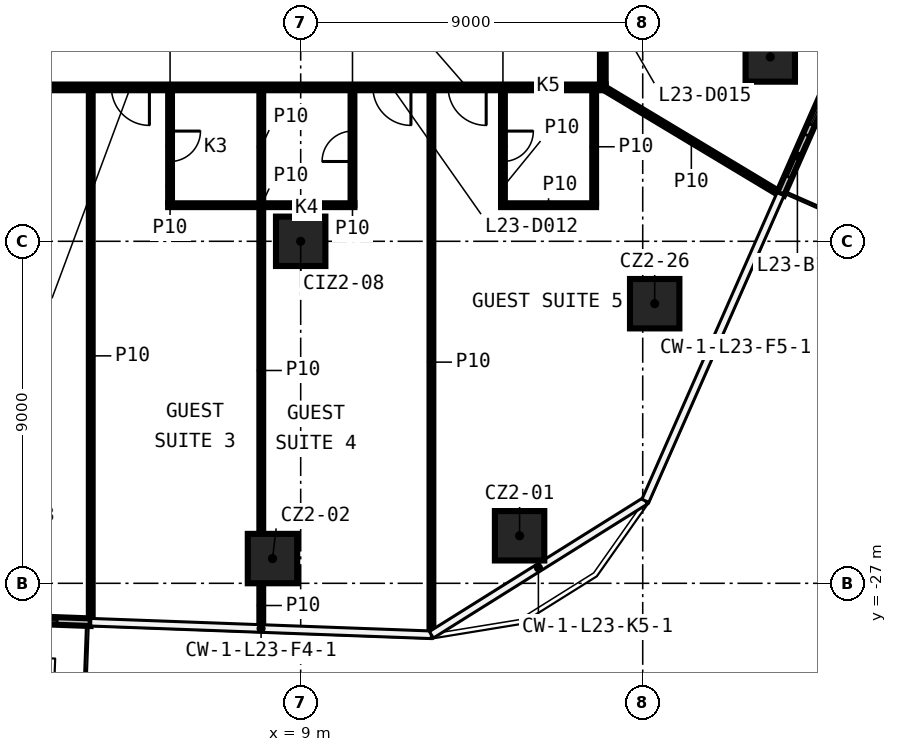
"""IFC4 building model, lengths in metres.
Left out: names, types, materials, properties, quantities, classifications, styles, units other than length and angle.
Written with IfcOpenShell. Run it as: python <this file> out.ifc"""

import sys

from ifc_helpers import new_model, si_unit, direction, frame, frame_2d, origin, origin_2d, place, context, subcontext, project, spatial, rectangle, extrude, element, fill, save


model = new_model("IFC4")
c1 = context("Model", 3, precision=1e-05, world=origin(), true_north=direction((0.0, 1.0)))
c2 = subcontext(c1, "Body", "Model", "MODEL_VIEW")
j1 = project(units=[si_unit("LENGTHUNIT", "METRE"), si_unit("PLANEANGLEUNIT", "RADIAN")], contexts=[c1])
p1 = place(None, origin())
s1 = spatial("IfcSite", under=j1, at=p1, CompositionType="ELEMENT")
p2 = place(p1, origin())
s2 = spatial("IfcBuilding", under=s1, at=p2, CompositionType="ELEMENT")
p3 = place(p2, frame((0.0, 0.0, 110.0)))
s3 = spatial("IfcBuildingStorey", under=s2, at=p3, CompositionType="ELEMENT", Elevation=110.0)
for number, where, z_axis, x_axis in (
    (1, (14.76, -25.749, 0.0), (0.0, 0.0, 1.0), (1.0, 0.0, 0.0)),
    (2, (8.258, -26.349, 0.0), (0.0, 0.0, 1.0), (1.0, 0.0, 0.0)),
    (3, (21.356, -13.15, 0.0), (0.0, 0.0, 1.0), (1.0, 0.0, 0.0)),
    (4, (18.315, -19.642, 0.0), (0.0, 0.0, 1.0), (1.0, 0.0, 0.0)),
    (5, (9.0, -18.0, 0.0), (0.0, 0.0, 1.0), (1.0, 0.0, 0.0)),
):
    element("IfcColumn", number, at=place(p3, frame(where, z_axis=z_axis, x_axis=x_axis)), inside=s3, PredefinedType="COLUMN", context=c2, shape_type="SweptSolid", body=[
        extrude(rectangle(XDim=1.3, YDim=1.3, at=origin_2d()), origin(), (0.0, 0.0, 1.0), 3.3),
    ])
p4 = place(p3, frame((5.513, -17.05, 0.0), z_axis=(0.0, 0.0, 1.0), x_axis=(1.0, 0.0, 0.0)))
e6 = element("IfcWall", 6, at=p4, inside=s3, PredefinedType="PARTITIONING", context=c2, shape_type="SweptSolid", body=[
    extrude(rectangle(XDim=4.9, YDim=0.1, at=frame_2d((2.45, 0.0))), origin(), (0.0, 0.0, 1.0), 3.3),
])
p5 = place(p3, frame((14.272, -17.05, 0.0), z_axis=(0.0, 0.0, 1.0), x_axis=(1.0, 0.0, 0.0)))
e7 = element("IfcWall", 7, at=p5, inside=s3, PredefinedType="PARTITIONING", context=c2, shape_type="SweptSolid", body=[
    extrude(rectangle(XDim=2.5, YDim=0.1, at=frame_2d((1.25, 0.0))), origin(), (0.0, 0.0, 1.0), 3.3),
])
p6 = place(p3, frame((17.025, -13.95, 0.0), z_axis=(0.0, 0.0, 1.0), x_axis=(-1.0, 0.0, 0.0)))
e8 = element("IfcWall", 8, at=p6, inside=s3, PredefinedType="PARTITIONING", context=c2, shape_type="SweptSolid", body=[
    extrude(rectangle(XDim=34.05, YDim=0.15, at=frame_2d((17.025, 0.0))), origin(), (0.0, 0.0, 1.0), 3.3),
])
p7 = place(p6, frame((31.974, 0.0, 0.0)))
e9 = element("IfcOpeningElement", 9, at=p7, cuts=e8, PredefinedType="OPENING", context=c2, shape_type="SweptSolid", body=[
    extrude(rectangle(XDim=0.9, YDim=2.1, at=frame_2d((0.45, 1.05))), frame((0.0, 0.085, 0.0), z_axis=(0.0, -1.0, 0.0), x_axis=(1.0, 0.0, 0.0)), (0.0, 0.0, 1.0), 0.17),
])
p8 = place(p6, frame((27.543, 0.0, 0.0)))
e10 = element("IfcOpeningElement", 10, at=p8, cuts=e8, PredefinedType="OPENING", context=c2, shape_type="SweptSolid", body=[
    extrude(rectangle(XDim=1.0, YDim=2.1, at=frame_2d((0.5, 1.05))), frame((0.0, 0.085, 0.0), z_axis=(0.0, -1.0, 0.0), x_axis=(1.0, 0.0, 0.0)), (0.0, 0.0, 1.0), 0.17),
])
p9 = place(p6, frame((16.333, 0.0, 0.0)))
e11 = element("IfcOpeningElement", 11, at=p9, cuts=e8, PredefinedType="OPENING", context=c2, shape_type="SweptSolid", body=[
    extrude(rectangle(XDim=1.0, YDim=2.1, at=frame_2d((0.5, 1.05))), frame((0.0, 0.085, 0.0), z_axis=(0.0, -1.0, 0.0), x_axis=(1.0, 0.0, 0.0)), (0.0, 0.0, 1.0), 0.17),
])
p10 = place(p6, frame((12.006, 0.0, 0.0)))
e12 = element("IfcOpeningElement", 12, at=p10, cuts=e8, PredefinedType="OPENING", context=c2, shape_type="SweptSolid", body=[
    extrude(rectangle(XDim=1.0, YDim=2.1, at=frame_2d((0.5, 1.05))), frame((0.0, 0.085, 0.0), z_axis=(0.0, -1.0, 0.0), x_axis=(1.0, 0.0, 0.0)), (0.0, 0.0, 1.0), 0.17),
])
p11 = place(p6, frame((5.124, 0.0, 0.0)))
e13 = element("IfcOpeningElement", 13, at=p11, cuts=e8, PredefinedType="OPENING", context=c2, shape_type="SweptSolid", body=[
    extrude(rectangle(XDim=1.0, YDim=2.1, at=frame_2d((0.5, 1.05))), frame((0.0, 0.085, 0.0), z_axis=(0.0, -1.0, 0.0), x_axis=(1.0, 0.0, 0.0)), (0.0, 0.0, 1.0), 0.17),
])
p12 = place(p6, frame((3.144, 0.0, 0.0)))
e14 = element("IfcOpeningElement", 14, at=p12, cuts=e8, PredefinedType="OPENING", context=c2, shape_type="SweptSolid", body=[
    extrude(rectangle(XDim=1.0, YDim=2.1, at=frame_2d((0.5, 1.05))), frame((0.0, 0.085, 0.0), z_axis=(0.0, -1.0, 0.0), x_axis=(1.0, 0.0, 0.0)), (0.0, 0.0, 1.0), 0.17),
])
p13 = place(p3, frame((16.95, 13.875, 0.0), z_axis=(0.0, 0.0, 1.0), x_axis=(0.0, -1.0, 0.0)))
e15 = element("IfcWall", 15, at=p13, inside=s3, PredefinedType="PARTITIONING", context=c2, shape_type="SweptSolid", body=[
    extrude(rectangle(XDim=27.75, YDim=0.15, at=frame_2d((13.875, 0.0))), origin(), (0.0, 0.0, 1.0), 3.3),
])
p14 = place(p13, frame((24.917, 0.0, 0.0)))
e16 = element("IfcOpeningElement", 16, at=p14, cuts=e15, PredefinedType="OPENING", context=c2, shape_type="SweptSolid", body=[
    extrude(rectangle(XDim=0.9, YDim=2.1, at=frame_2d((0.45, 1.05))), frame((0.0, 0.085, 0.0), z_axis=(0.0, -1.0, 0.0), x_axis=(1.0, 0.0, 0.0)), (0.0, 0.0, 1.0), 0.17),
])
p15 = place(p13, frame((20.086, 0.0, 0.0)))
e17 = element("IfcOpeningElement", 17, at=p15, cuts=e15, PredefinedType="OPENING", context=c2, shape_type="SweptSolid", body=[
    extrude(rectangle(XDim=0.9, YDim=2.1, at=frame_2d((0.45, 1.05))), frame((0.0, 0.085, 0.0), z_axis=(0.0, -1.0, 0.0), x_axis=(1.0, 0.0, 0.0)), (0.0, 0.0, 1.0), 0.17),
])
p16 = place(p13, frame((16.047, 0.0, 0.0)))
e18 = element("IfcOpeningElement", 18, at=p16, cuts=e15, PredefinedType="OPENING", context=c2, shape_type="SweptSolid", body=[
    extrude(rectangle(XDim=0.9, YDim=2.1, at=frame_2d((0.45, 1.05))), frame((0.0, 0.085, 0.0), z_axis=(0.0, -1.0, 0.0), x_axis=(1.0, 0.0, 0.0)), (0.0, 0.0, 1.0), 0.17),
])
p17 = place(p13, frame((11.091, 0.0, 0.0)))
e19 = element("IfcOpeningElement", 19, at=p17, cuts=e15, PredefinedType="OPENING", context=c2, shape_type="SweptSolid", body=[
    extrude(rectangle(XDim=0.9, YDim=2.1, at=frame_2d((0.45, 1.05))), frame((0.0, 0.085, 0.0), z_axis=(0.0, -1.0, 0.0), x_axis=(1.0, 0.0, 0.0)), (0.0, 0.0, 1.0), 0.17),
])
p18 = place(p13, frame((7.093, 0.0, 0.0)))
e20 = element("IfcOpeningElement", 20, at=p18, cuts=e15, PredefinedType="OPENING", context=c2, shape_type="SweptSolid", body=[
    extrude(rectangle(XDim=0.9, YDim=2.1, at=frame_2d((0.45, 1.05))), frame((0.0, 0.085, 0.0), z_axis=(0.0, -1.0, 0.0), x_axis=(1.0, 0.0, 0.0)), (0.0, 0.0, 1.0), 0.17),
])
p19 = place(p13, frame((2.057, 0.0, 0.0)))
e21 = element("IfcOpeningElement", 21, at=p19, cuts=e15, PredefinedType="OPENING", context=c2, shape_type="SweptSolid", body=[
    extrude(rectangle(XDim=0.9, YDim=2.1, at=frame_2d((0.45, 1.05))), frame((0.0, 0.085, 0.0), z_axis=(0.0, -1.0, 0.0), x_axis=(1.0, 0.0, 0.0)), (0.0, 0.0, 1.0), 0.17),
])
p20 = place(p3, frame((16.722, -17.0, 0.0), z_axis=(0.0, 0.0, 1.0), x_axis=(0.0, 1.0, 0.0)))
e22 = element("IfcWall", 22, at=p20, inside=s3, PredefinedType="PARTITIONING", context=c2, shape_type="SweptSolid", body=[
    extrude(rectangle(XDim=2.975, YDim=0.1, at=frame_2d((1.488, 0.0))), origin(), (0.0, 0.0, 1.0), 3.3),
])
p21 = place(p3, frame((14.322, -14.025, 0.0), z_axis=(0.0, 0.0, 1.0), x_axis=(0.0, -1.0, 0.0)))
e23 = element("IfcWall", 23, at=p21, inside=s3, PredefinedType="PARTITIONING", context=c2, shape_type="SweptSolid", body=[
    extrude(rectangle(XDim=3.025, YDim=0.1, at=frame_2d((1.513, 0.0))), origin(), (0.0, 0.0, 1.0), 3.3),
])
p22 = place(p21, frame((1.075, 0.0, 0.0)))
e24 = element("IfcOpeningElement", 24, at=p22, cuts=e23, PredefinedType="OPENING", context=c2, shape_type="SweptSolid", body=[
    extrude(rectangle(XDim=0.8, YDim=2.1, at=frame_2d((0.4, 1.05))), frame((0.0, 0.06, 0.0), z_axis=(0.0, -1.0, 0.0), x_axis=(1.0, 0.0, 0.0)), (0.0, 0.0, 1.0), 0.12),
])
p23 = place(p3, frame((12.44, -28.334, 0.0), z_axis=(0.0, 0.0, 1.0), x_axis=(0.0, 1.0, 0.0)))
e25 = element("IfcWall", 25, at=p23, inside=s3, PredefinedType="PARTITIONING", context=c2, shape_type="SweptSolid", body=[
    extrude(rectangle(XDim=14.31, YDim=0.1, at=frame_2d((7.155, 0.0))), origin(), (0.0, 0.0, 1.0), 3.3),
])
p24 = place(p3, frame((10.363, -17.05, 0.0), z_axis=(0.0, 0.0, 1.0), x_axis=(0.0, 1.0, 0.0)))
e26 = element("IfcWall", 26, at=p24, inside=s3, PredefinedType="PARTITIONING", context=c2, shape_type="SweptSolid", body=[
    extrude(rectangle(XDim=3.025, YDim=0.1, at=frame_2d((1.513, 0.0))), origin(), (0.0, 0.0, 1.0), 3.3),
])
p25 = place(p24, frame((1.15, 0.0, 0.0)))
e27 = element("IfcOpeningElement", 27, at=p25, cuts=e26, PredefinedType="OPENING", context=c2, shape_type="SweptSolid", body=[
    extrude(rectangle(XDim=0.8, YDim=2.1, at=frame_2d((0.4, 1.05))), frame((0.0, 0.06, 0.0), z_axis=(0.0, -1.0, 0.0), x_axis=(1.0, 0.0, 0.0)), (0.0, 0.0, 1.0), 0.12),
])
p26 = place(p3, frame((7.963, -28.17, 0.0), z_axis=(0.0, 0.0, 1.0), x_axis=(0.0, 1.0, 0.0)))
e28 = element("IfcWall", 28, at=p26, inside=s3, PredefinedType="PARTITIONING", context=c2, shape_type="SweptSolid", body=[
    extrude(rectangle(XDim=1.171, YDim=0.1, at=frame_2d((0.585, 0.0))), origin(), (0.0, 0.0, 1.0), 3.3),
])
p27 = place(p3, frame((7.963, -25.699, 0.0), z_axis=(0.0, 0.0, 1.0), x_axis=(0.0, 1.0, 0.0)))
e29 = element("IfcWall", 29, at=p27, inside=s3, PredefinedType="PARTITIONING", context=c2, shape_type="SweptSolid", body=[
    extrude(rectangle(XDim=8.599, YDim=0.1, at=frame_2d((4.299, 0.0))), origin(), (0.0, 0.0, 1.0), 3.3),
])
p28 = place(p3, frame((7.963, -17.0, 0.0), z_axis=(0.0, 0.0, 1.0), x_axis=(0.0, 1.0, 0.0)))
e30 = element("IfcWall", 30, at=p28, inside=s3, PredefinedType="PARTITIONING", context=c2, shape_type="SweptSolid", body=[
    extrude(rectangle(XDim=2.975, YDim=0.1, at=frame_2d((1.488, 0.0))), origin(), (0.0, 0.0, 1.0), 3.3),
])
p29 = place(p3, frame((5.563, -14.025, 0.0), z_axis=(0.0, 0.0, 1.0), x_axis=(0.0, -1.0, 0.0)))
e31 = element("IfcWall", 31, at=p29, inside=s3, PredefinedType="PARTITIONING", context=c2, shape_type="SweptSolid", body=[
    extrude(rectangle(XDim=2.975, YDim=0.1, at=frame_2d((1.488, 0.0))), origin(), (0.0, 0.0, 1.0), 3.3),
])
p30 = place(p29, frame((1.075, 0.0, 0.0)))
e32 = element("IfcOpeningElement", 32, at=p30, cuts=e31, PredefinedType="OPENING", context=c2, shape_type="SweptSolid", body=[
    extrude(rectangle(XDim=0.8, YDim=2.1, at=frame_2d((0.4, 1.05))), frame((0.0, 0.06, 0.0), z_axis=(0.0, -1.0, 0.0), x_axis=(1.0, 0.0, 0.0)), (0.0, 0.0, 1.0), 0.12),
])
p31 = place(p3, frame((3.476, -28.004, 0.0), z_axis=(0.0, 0.0, 1.0), x_axis=(0.0, 1.0, 0.0)))
e33 = element("IfcWall", 33, at=p31, inside=s3, PredefinedType="PARTITIONING", context=c2, shape_type="SweptSolid", body=[
    extrude(rectangle(XDim=13.979, YDim=0.1, at=frame_2d((6.99, 0.0))), origin(), (0.0, 0.0, 1.0), 3.3),
])
p32 = place(p3, frame((16.95, -13.95, 0.0), z_axis=(0.0, 0.0, 1.0), x_axis=(0.857183640751, -0.515010879525, 0.0)))
e34 = element("IfcWall", 34, at=p32, inside=s3, PredefinedType="PARTITIONING", context=c2, shape_type="SweptSolid", body=[
    extrude(rectangle(XDim=5.436, YDim=0.1, at=frame_2d((2.718, 0.0))), origin(), (0.0, 0.0, 1.0), 3.3),
])
p33 = place(p3, frame((-9.975, -27.528, 0.0), z_axis=(0.0, 0.0, 1.0), x_axis=(0.999319917794, -0.036874135924, 0.0)))
e35 = element("IfcWall", 35, at=p33, inside=s3, PredefinedType="SOLIDWALL", context=c2, shape_type="SweptSolid", body=[
    extrude(rectangle(XDim=13.46, YDim=0.2, at=frame_2d((6.73, 0.0))), origin(), (0.0, 0.0, 1.0), 3.3),
])
p34 = place(p33, frame((2.0, 0.0, 0.6)))
e36 = element("IfcOpeningElement", 36, at=p34, cuts=e35, PredefinedType="OPENING", context=c2, shape_type="SweptSolid", body=[
    extrude(rectangle(XDim=1.6, YDim=2.4, at=frame_2d((0.8, 1.2))), frame((0.0, 0.11, 0.0), z_axis=(0.0, -1.0, 0.0), x_axis=(1.0, 0.0, 0.0)), (0.0, 0.0, 1.0), 0.22),
])
p35 = place(p33, frame((0.5, 0.0, 0.0)))
e37 = element("IfcOpeningElement", 37, at=p35, cuts=e35, PredefinedType="OPENING", context=c2, shape_type="SweptSolid", body=[
    extrude(rectangle(XDim=1.2, YDim=2.4, at=frame_2d((0.6, 1.2))), frame((0.0, 0.11, 0.0), z_axis=(0.0, -1.0, 0.0), x_axis=(1.0, 0.0, 0.0)), (0.0, 0.0, 1.0), 0.22),
])
p36 = place(p33, frame((4.987, 0.0, 0.6)))
e38 = element("IfcOpeningElement", 38, at=p36, cuts=e35, PredefinedType="OPENING", context=c2, shape_type="SweptSolid", body=[
    extrude(rectangle(XDim=1.6, YDim=2.4, at=frame_2d((0.8, 1.2))), frame((0.0, 0.11, 0.0), z_axis=(0.0, -1.0, 0.0), x_axis=(1.0, 0.0, 0.0)), (0.0, 0.0, 1.0), 0.22),
])
p37 = place(p33, frame((6.887, 0.0, 0.0)))
e39 = element("IfcOpeningElement", 39, at=p37, cuts=e35, PredefinedType="OPENING", context=c2, shape_type="SweptSolid", body=[
    extrude(rectangle(XDim=1.2, YDim=2.4, at=frame_2d((0.6, 1.2))), frame((0.0, 0.11, 0.0), z_axis=(0.0, -1.0, 0.0), x_axis=(1.0, 0.0, 0.0)), (0.0, 0.0, 1.0), 0.22),
])
p38 = place(p33, frame((10.974, 0.0, 0.6)))
e40 = element("IfcOpeningElement", 40, at=p38, cuts=e35, PredefinedType="OPENING", context=c2, shape_type="SweptSolid", body=[
    extrude(rectangle(XDim=1.6, YDim=2.4, at=frame_2d((0.8, 1.2))), frame((0.0, 0.11, 0.0), z_axis=(0.0, -1.0, 0.0), x_axis=(1.0, 0.0, 0.0)), (0.0, 0.0, 1.0), 0.22),
])
p39 = place(p33, frame((9.474, 0.0, 0.0)))
e41 = element("IfcOpeningElement", 41, at=p39, cuts=e35, PredefinedType="OPENING", context=c2, shape_type="SweptSolid", body=[
    extrude(rectangle(XDim=1.2, YDim=2.4, at=frame_2d((0.6, 1.2))), frame((0.0, 0.11, 0.0), z_axis=(0.0, -1.0, 0.0), x_axis=(1.0, 0.0, 0.0)), (0.0, 0.0, 1.0), 0.22),
])
p40 = place(p3, frame((21.626, -16.76, 0.0), z_axis=(0.0, 0.0, 1.0), x_axis=(0.403293642116, 0.915070619258, 0.0)))
e42 = element("IfcWall", 42, at=p40, inside=s3, PredefinedType="SOLIDWALL", context=c2, shape_type="SweptSolid", body=[
    extrude(rectangle(XDim=17.657, YDim=0.2, at=frame_2d((8.829, 0.0))), origin(), (0.0, 0.0, 1.0), 3.3),
])
p41 = place(p40, frame((2.0, 0.0, 0.6)))
e43 = element("IfcOpeningElement", 43, at=p41, cuts=e42, PredefinedType="OPENING", context=c2, shape_type="SweptSolid", body=[
    extrude(rectangle(XDim=1.6, YDim=2.4, at=frame_2d((0.8, 1.2))), frame((0.0, 0.11, 0.0), z_axis=(0.0, -1.0, 0.0), x_axis=(1.0, 0.0, 0.0)), (0.0, 0.0, 1.0), 0.22),
])
p42 = place(p40, frame((0.5, 0.0, 0.0)))
e44 = element("IfcOpeningElement", 44, at=p42, cuts=e42, PredefinedType="OPENING", context=c2, shape_type="SweptSolid", body=[
    extrude(rectangle(XDim=1.2, YDim=2.4, at=frame_2d((0.6, 1.2))), frame((0.0, 0.11, 0.0), z_axis=(0.0, -1.0, 0.0), x_axis=(1.0, 0.0, 0.0)), (0.0, 0.0, 1.0), 0.22),
])
p43 = place(p40, frame((6.414, 0.0, 0.6)))
e45 = element("IfcOpeningElement", 45, at=p43, cuts=e42, PredefinedType="OPENING", context=c2, shape_type="SweptSolid", body=[
    extrude(rectangle(XDim=1.6, YDim=2.4, at=frame_2d((0.8, 1.2))), frame((0.0, 0.11, 0.0), z_axis=(0.0, -1.0, 0.0), x_axis=(1.0, 0.0, 0.0)), (0.0, 0.0, 1.0), 0.22),
])
p44 = place(p40, frame((4.914, 0.0, 0.0)))
e46 = element("IfcOpeningElement", 46, at=p44, cuts=e42, PredefinedType="OPENING", context=c2, shape_type="SweptSolid", body=[
    extrude(rectangle(XDim=1.2, YDim=2.4, at=frame_2d((0.6, 1.2))), frame((0.0, 0.11, 0.0), z_axis=(0.0, -1.0, 0.0), x_axis=(1.0, 0.0, 0.0)), (0.0, 0.0, 1.0), 0.22),
])
p45 = place(p40, frame((9.329, 0.0, 0.6)))
e47 = element("IfcOpeningElement", 47, at=p45, cuts=e42, PredefinedType="OPENING", context=c2, shape_type="SweptSolid", body=[
    extrude(rectangle(XDim=1.6, YDim=2.4, at=frame_2d((0.8, 1.2))), frame((0.0, 0.11, 0.0), z_axis=(0.0, -1.0, 0.0), x_axis=(1.0, 0.0, 0.0)), (0.0, 0.0, 1.0), 0.22),
])
p46 = place(p40, frame((11.329, 0.0, 0.0)))
e48 = element("IfcOpeningElement", 48, at=p46, cuts=e42, PredefinedType="OPENING", context=c2, shape_type="SweptSolid", body=[
    extrude(rectangle(XDim=1.2, YDim=2.4, at=frame_2d((0.6, 1.2))), frame((0.0, 0.11, 0.0), z_axis=(0.0, -1.0, 0.0), x_axis=(1.0, 0.0, 0.0)), (0.0, 0.0, 1.0), 0.22),
])
p47 = place(p40, frame((15.243, 0.0, 0.6)))
e49 = element("IfcOpeningElement", 49, at=p47, cuts=e42, PredefinedType="OPENING", context=c2, shape_type="SweptSolid", body=[
    extrude(rectangle(XDim=1.6, YDim=2.4, at=frame_2d((0.8, 1.2))), frame((0.0, 0.11, 0.0), z_axis=(0.0, -1.0, 0.0), x_axis=(1.0, 0.0, 0.0)), (0.0, 0.0, 1.0), 0.22),
])
p48 = place(p40, frame((13.743, 0.0, 0.0)))
e50 = element("IfcOpeningElement", 50, at=p48, cuts=e42, PredefinedType="OPENING", context=c2, shape_type="SweptSolid", body=[
    extrude(rectangle(XDim=1.2, YDim=2.4, at=frame_2d((0.6, 1.2))), frame((0.0, 0.11, 0.0), z_axis=(0.0, -1.0, 0.0), x_axis=(1.0, 0.0, 0.0)), (0.0, 0.0, 1.0), 0.22),
])
p49 = place(p30, origin())
e51 = element("IfcDoor", 51, at=p49, inside=s3, OperationType="SINGLE_SWING_RIGHT", PredefinedType="DOOR", context=c2, shape_type="SweptSolid", body=[
    extrude(rectangle(XDim=0.8, YDim=2.1, at=frame_2d((0.4, 1.05))), frame((0.0, 0.025, 0.0), z_axis=(0.0, -1.0, 0.0), x_axis=(1.0, 0.0, 0.0)), (0.0, 0.0, 1.0), 0.05),
])
fill(e32, e51)
p50 = place(p10, origin())
e52 = element("IfcDoor", 52, at=p50, inside=s3, OperationType="SINGLE_SWING_LEFT", PredefinedType="DOOR", context=c2, shape_type="SweptSolid", body=[
    extrude(rectangle(XDim=1.0, YDim=2.1, at=frame_2d((0.5, 1.05))), frame((0.0, 0.025, 0.0), z_axis=(0.0, -1.0, 0.0), x_axis=(1.0, 0.0, 0.0)), (0.0, 0.0, 1.0), 0.05),
])
fill(e12, e52)
p51 = place(p25, origin())
e53 = element("IfcDoor", 53, at=p51, inside=s3, OperationType="SINGLE_SWING_LEFT", PredefinedType="DOOR", context=c2, shape_type="SweptSolid", body=[
    extrude(rectangle(XDim=0.8, YDim=2.1, at=frame_2d((0.4, 1.05))), frame((0.0, 0.025, 0.0), z_axis=(0.0, -1.0, 0.0), x_axis=(1.0, 0.0, 0.0)), (0.0, 0.0, 1.0), 0.05),
])
fill(e27, e53)
p52 = place(p11, origin())
e54 = element("IfcDoor", 54, at=p52, inside=s3, OperationType="SINGLE_SWING_RIGHT", PredefinedType="DOOR", context=c2, shape_type="SweptSolid", body=[
    extrude(rectangle(XDim=1.0, YDim=2.1, at=frame_2d((0.5, 1.05))), frame((0.0, 0.025, 0.0), z_axis=(0.0, -1.0, 0.0), x_axis=(1.0, 0.0, 0.0)), (0.0, 0.0, 1.0), 0.05),
])
fill(e13, e54)
p53 = place(p22, origin())
e55 = element("IfcDoor", 55, at=p53, inside=s3, OperationType="SINGLE_SWING_RIGHT", PredefinedType="DOOR", context=c2, shape_type="SweptSolid", body=[
    extrude(rectangle(XDim=0.8, YDim=2.1, at=frame_2d((0.4, 1.05))), frame((0.0, 0.025, 0.0), z_axis=(0.0, -1.0, 0.0), x_axis=(1.0, 0.0, 0.0)), (0.0, 0.0, 1.0), 0.05),
])
fill(e24, e55)
p54 = place(p12, origin())
e56 = element("IfcDoor", 56, at=p54, inside=s3, OperationType="SINGLE_SWING_LEFT", PredefinedType="DOOR", context=c2, shape_type="SweptSolid", body=[
    extrude(rectangle(XDim=1.0, YDim=2.1, at=frame_2d((0.5, 1.05))), frame((0.0, 0.025, 0.0), z_axis=(0.0, -1.0, 0.0), x_axis=(1.0, 0.0, 0.0)), (0.0, 0.0, 1.0), 0.05),
])
fill(e14, e56)
p55 = place(p38, origin())
e57 = element("IfcWindow", 57, at=p55, inside=s3, PartitioningType="SINGLE_PANEL", PredefinedType="WINDOW", context=c2, shape_type="SweptSolid", body=[
    extrude(rectangle(XDim=1.6, YDim=2.4, at=frame_2d((0.8, 1.2))), frame((0.0, 0.03, 0.0), z_axis=(0.0, -1.0, 0.0), x_axis=(1.0, 0.0, 0.0)), (0.0, 0.0, 1.0), 0.06),
])
fill(e40, e57)
p56 = place(p41, origin())
e58 = element("IfcWindow", 58, at=p56, inside=s3, PartitioningType="SINGLE_PANEL", PredefinedType="WINDOW", context=c2, shape_type="SweptSolid", body=[
    extrude(rectangle(XDim=1.6, YDim=2.4, at=frame_2d((0.8, 1.2))), frame((0.0, 0.03, 0.0), z_axis=(0.0, -1.0, 0.0), x_axis=(1.0, 0.0, 0.0)), (0.0, 0.0, 1.0), 0.06),
])
fill(e43, e58)
p57 = place(p42, origin())
e59 = element("IfcDoor", 59, at=p57, inside=s3, OperationType="SLIDING_TO_LEFT", PredefinedType="DOOR", context=c2, shape_type="SweptSolid", body=[
    extrude(rectangle(XDim=1.2, YDim=2.4, at=frame_2d((0.6, 1.2))), frame((0.0, 0.025, 0.0), z_axis=(0.0, -1.0, 0.0), x_axis=(1.0, 0.0, 0.0)), (0.0, 0.0, 1.0), 0.05),
])
fill(e44, e59)
save(model, sys.argv[1])
